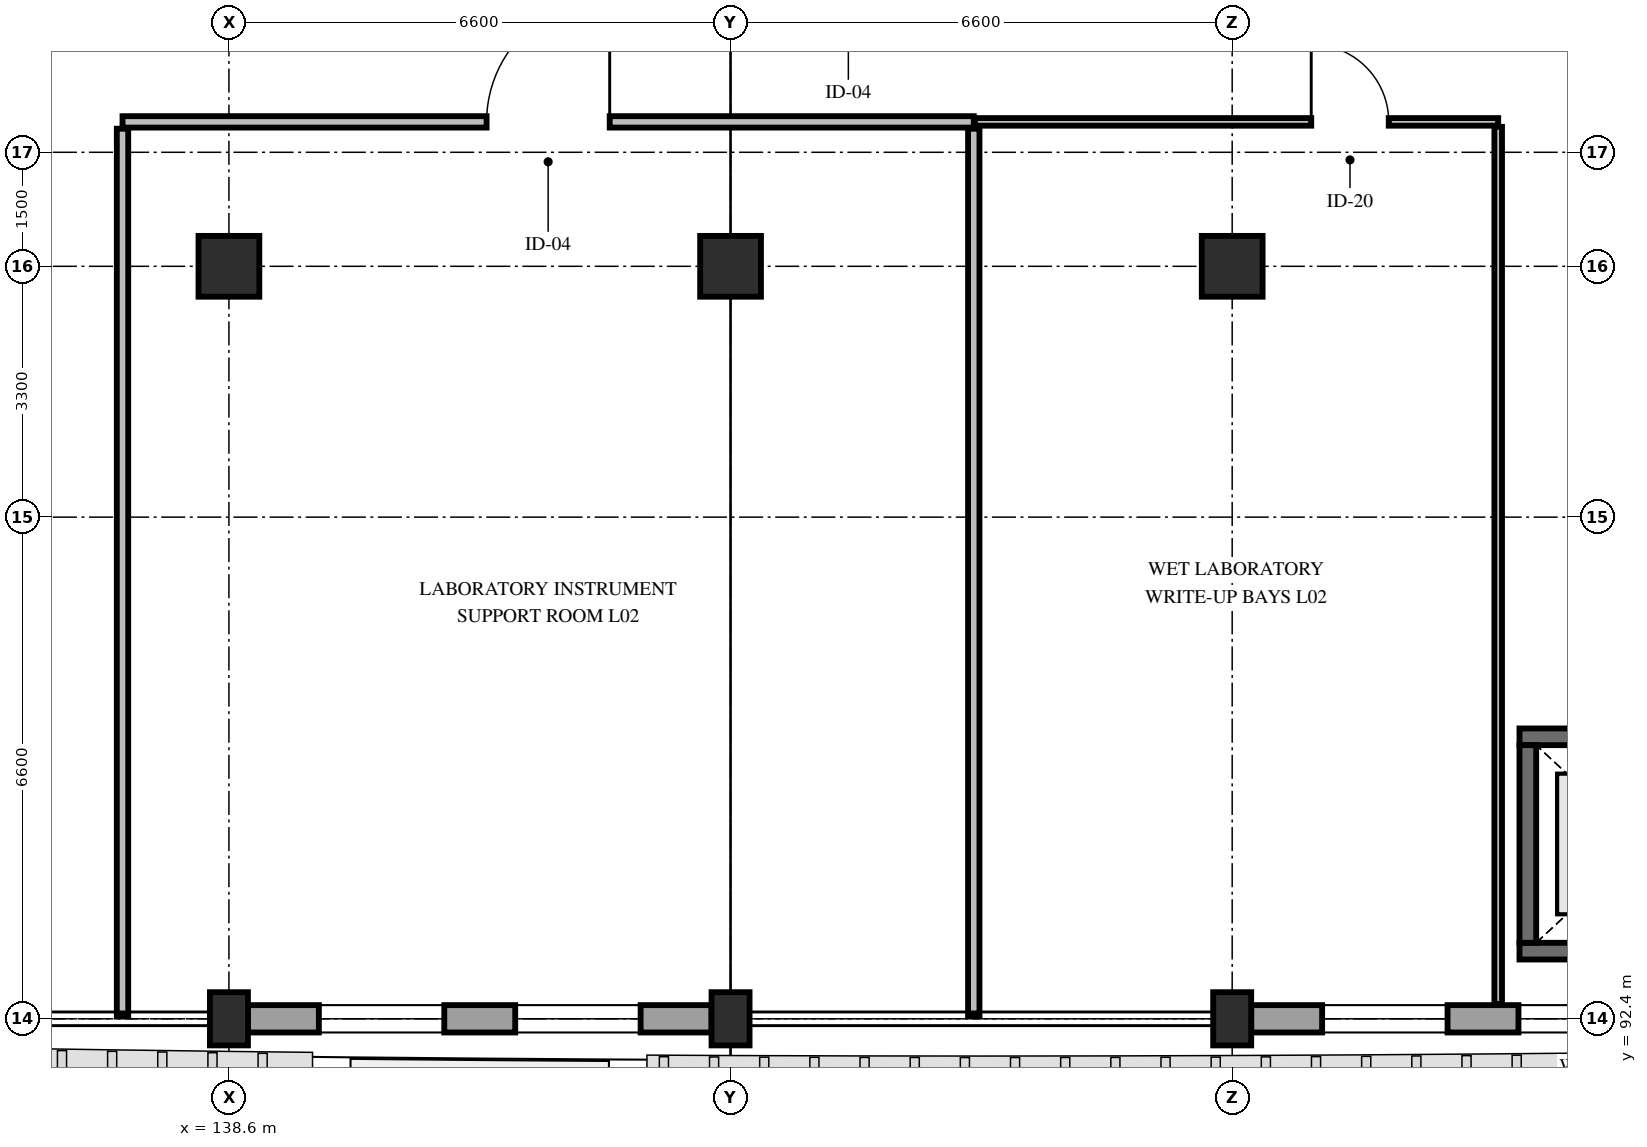
"""IFC4 building model, lengths in metres.
Left out: names, types, materials, properties, quantities, classifications, styles, units other than length and angle.
Written with IfcOpenShell. Run it as: python <this file> out.ifc"""

import sys

from ifc_helpers import new_model, si_unit, direction, frame, frame_2d, origin, origin_2d, place, context, subcontext, project, spatial, rectangle, extrude, element, fill, save


model = new_model("IFC4")
c1 = context("Model", 3, precision=1e-05, world=origin(), true_north=direction((0.0, 1.0)))
c2 = subcontext(c1, "Body", "Model", "MODEL_VIEW")
j1 = project(units=[si_unit("LENGTHUNIT", "METRE"), si_unit("PLANEANGLEUNIT", "RADIAN")], contexts=[c1])
p1 = place(None, origin())
s1 = spatial("IfcSite", under=j1, at=p1, CompositionType="ELEMENT")
p2 = place(p1, origin())
s2 = spatial("IfcBuilding", under=s1, at=p2, CompositionType="ELEMENT")
p3 = place(p2, frame((0.0, 0.0, 10.2)))
s3 = spatial("IfcBuildingStorey", under=s2, at=p3, CompositionType="ELEMENT", Elevation=10.2)
p4 = place(p3, frame((138.6, 92.4, 0.0), z_axis=(0.0, 0.0, 1.0), x_axis=(1.0, 0.0, 0.0)))
e1 = element("IfcColumn", 1, at=p4, inside=s3, PredefinedType="PILASTER", context=c2, shape_type="SweptSolid", body=[
    extrude(rectangle(XDim=0.5, YDim=0.7, at=origin_2d()), origin(), (0.0, 0.0, 1.0), 4.8),
])
p5 = place(p3, frame((138.6, 102.3, 0.0), z_axis=(0.0, 0.0, 1.0), x_axis=(1.0, 0.0, 0.0)))
e2 = element("IfcColumn", 2, at=p5, inside=s3, PredefinedType="COLUMN", context=c2, shape_type="SweptSolid", body=[
    extrude(rectangle(XDim=0.8, YDim=0.8, at=origin_2d()), origin(), (0.0, 0.0, 1.0), 4.8),
])
p6 = place(p3, frame((145.2, 92.4, 0.0), z_axis=(0.0, 0.0, 1.0), x_axis=(1.0, 0.0, 0.0)))
e3 = element("IfcColumn", 3, at=p6, inside=s3, PredefinedType="PILASTER", context=c2, shape_type="SweptSolid", body=[
    extrude(rectangle(XDim=0.5, YDim=0.7, at=origin_2d()), origin(), (0.0, 0.0, 1.0), 4.8),
])
p7 = place(p3, frame((145.2, 102.3, 0.0), z_axis=(0.0, 0.0, 1.0), x_axis=(1.0, 0.0, 0.0)))
e4 = element("IfcColumn", 4, at=p7, inside=s3, PredefinedType="COLUMN", context=c2, shape_type="SweptSolid", body=[
    extrude(rectangle(XDim=0.8, YDim=0.8, at=origin_2d()), origin(), (0.0, 0.0, 1.0), 4.8),
])
p8 = place(p3, frame((151.8, 92.4, 0.0), z_axis=(0.0, 0.0, 1.0), x_axis=(1.0, 0.0, 0.0)))
e5 = element("IfcColumn", 5, at=p8, inside=s3, PredefinedType="PILASTER", context=c2, shape_type="SweptSolid", body=[
    extrude(rectangle(XDim=0.5, YDim=0.7, at=origin_2d()), origin(), (0.0, 0.0, 1.0), 4.8),
])
p9 = place(p3, frame((151.8, 102.3, 0.0), z_axis=(0.0, 0.0, 1.0), x_axis=(1.0, 0.0, 0.0)))
e6 = element("IfcColumn", 6, at=p9, inside=s3, PredefinedType="COLUMN", context=c2, shape_type="SweptSolid", body=[
    extrude(rectangle(XDim=0.8, YDim=0.8, at=origin_2d()), origin(), (0.0, 0.0, 1.0), 4.8),
])
p10 = place(p3, frame((158.15, 92.4, 0.0), z_axis=(0.0, 0.0, 1.0), x_axis=(-1.0, 0.0, 0.0)))
e7 = element("IfcWall", 7, at=p10, inside=s3, PredefinedType="STANDARD", context=c2, shape_type="SweptSolid", body=[
    extrude(rectangle(XDim=6.1, YDim=0.36, at=frame_2d((3.05, 0.0))), origin(), (0.0, 0.0, 1.0), 3.78),
])
p11 = place(p10, frame((0.933, 0.0, 0.85)))
e8 = element("IfcOpeningElement", 8, at=p11, cuts=e7, PredefinedType="OPENING", context=c2, shape_type="SweptSolid", body=[
    extrude(rectangle(XDim=1.65, YDim=2.08, at=frame_2d((0.825, 1.04))), frame((0.0, 0.195, 0.0), z_axis=(0.0, -1.0, 0.0), x_axis=(1.0, 0.0, 0.0)), (0.0, 0.0, 1.0), 0.39),
])
p12 = place(p10, frame((3.517, 0.0, 0.85)))
e9 = element("IfcOpeningElement", 9, at=p12, cuts=e7, PredefinedType="OPENING", context=c2, shape_type="SweptSolid", body=[
    extrude(rectangle(XDim=1.65, YDim=2.08, at=frame_2d((0.825, 1.04))), frame((0.0, 0.195, 0.0), z_axis=(0.0, -1.0, 0.0), x_axis=(1.0, 0.0, 0.0)), (0.0, 0.0, 1.0), 0.39),
])
p13 = place(p3, frame((144.95, 92.4, 0.0), z_axis=(0.0, 0.0, 1.0), x_axis=(-1.0, 0.0, 0.0)))
e10 = element("IfcWall", 10, at=p13, inside=s3, PredefinedType="STANDARD", context=c2, shape_type="SweptSolid", body=[
    extrude(rectangle(XDim=6.1, YDim=0.36, at=frame_2d((3.05, 0.0))), origin(), (0.0, 0.0, 1.0), 3.78),
])
p14 = place(p13, frame((0.933, 0.0, 0.85)))
e11 = element("IfcOpeningElement", 11, at=p14, cuts=e10, PredefinedType="OPENING", context=c2, shape_type="SweptSolid", body=[
    extrude(rectangle(XDim=1.65, YDim=2.08, at=frame_2d((0.825, 1.04))), frame((0.0, 0.195, 0.0), z_axis=(0.0, -1.0, 0.0), x_axis=(1.0, 0.0, 0.0)), (0.0, 0.0, 1.0), 0.39),
])
p15 = place(p13, frame((3.517, 0.0, 0.85)))
e12 = element("IfcOpeningElement", 12, at=p15, cuts=e10, PredefinedType="OPENING", context=c2, shape_type="SweptSolid", body=[
    extrude(rectangle(XDim=1.65, YDim=2.08, at=frame_2d((0.825, 1.04))), frame((0.0, 0.195, 0.0), z_axis=(0.0, -1.0, 0.0), x_axis=(1.0, 0.0, 0.0)), (0.0, 0.0, 1.0), 0.39),
])
p16 = place(p3, frame((155.58, 93.29, 0.0), z_axis=(0.0, 0.0, 1.0), x_axis=(1.0, 0.0, 0.0)))
e13 = element("IfcWall", 13, at=p16, inside=s3, PredefinedType="SHEAR", context=c2, shape_type="SweptSolid", body=[
    extrude(rectangle(XDim=3.24, YDim=0.22, at=frame_2d((1.62, 0.0))), origin(), (0.0, 0.0, 1.0), 4.46),
])
p17 = place(p3, frame((155.58, 96.11, 0.0), z_axis=(0.0, 0.0, 1.0), x_axis=(1.0, 0.0, 0.0)))
e14 = element("IfcWall", 14, at=p17, inside=s3, PredefinedType="SHEAR", context=c2, shape_type="SweptSolid", body=[
    extrude(rectangle(XDim=3.24, YDim=0.22, at=frame_2d((1.62, 0.0))), origin(), (0.0, 0.0, 1.0), 4.46),
])
p18 = place(p17, frame((0.92, 0.0, 0.0)))
e15 = element("IfcOpeningElement", 15, at=p18, cuts=e14, PredefinedType="OPENING", context=c2, shape_type="SweptSolid", body=[
    extrude(rectangle(XDim=1.4, YDim=2.3, at=frame_2d((0.7, 1.15))), frame((0.0, 0.125, 0.0), z_axis=(0.0, -1.0, 0.0), x_axis=(1.0, 0.0, 0.0)), (0.0, 0.0, 1.0), 0.25),
])
p19 = place(p3, frame((155.69, 93.4, 0.0), z_axis=(0.0, 0.0, 1.0), x_axis=(0.0, 1.0, 0.0)))
e16 = element("IfcWall", 16, at=p19, inside=s3, PredefinedType="SHEAR", context=c2, shape_type="SweptSolid", body=[
    extrude(rectangle(XDim=2.6, YDim=0.22, at=frame_2d((1.3, 0.0))), origin(), (0.0, 0.0, 1.0), 4.46),
])
p20 = place(p3, frame((137.2, 104.2, 0.0), z_axis=(0.0, 0.0, 1.0), x_axis=(1.0, 0.0, 0.0)))
e17 = element("IfcWall", 17, at=p20, inside=s3, PredefinedType="PARTITIONING", context=c2, shape_type="SweptSolid", body=[
    extrude(rectangle(XDim=11.2, YDim=0.15, at=frame_2d((5.6, 0.0))), origin(), (0.0, 0.0, 1.0), 3.78),
])
p21 = place(p20, frame((4.79, 0.0, 0.0)))
e18 = element("IfcOpeningElement", 18, at=p21, cuts=e17, PredefinedType="OPENING", context=c2, shape_type="SweptSolid", body=[
    extrude(rectangle(XDim=1.62, YDim=2.3, at=frame_2d((0.81, 1.15))), frame((0.0, 0.09, 0.0), z_axis=(0.0, -1.0, 0.0), x_axis=(1.0, 0.0, 0.0)), (0.0, 0.0, 1.0), 0.18),
])
for number, where, z_axis, x_axis in (
    (19, (137.2, 92.44, 0.0), (0.0, 0.0, 1.0), (0.0, 1.0, 0.0)),
    (20, (148.4, 92.44, 0.0), (0.0, 0.0, 1.0), (0.0, 1.0, 0.0)),
):
    element("IfcWall", number, at=place(p3, frame(where, z_axis=z_axis, x_axis=x_axis)), inside=s3, PredefinedType="PARTITIONING", context=c2, shape_type="SweptSolid", body=[
        extrude(rectangle(XDim=11.67, YDim=0.15, at=frame_2d((5.835, 0.0))), origin(), (0.0, 0.0, 1.0), 3.93),
    ])
p22 = place(p3, frame((148.415, 104.2, 0.0), z_axis=(0.0, 0.0, 1.0), x_axis=(1.0, 0.0, 0.0)))
e21 = element("IfcWall", 21, at=p22, inside=s3, PredefinedType="PARTITIONING", context=c2, shape_type="SweptSolid", body=[
    extrude(rectangle(XDim=6.885, YDim=0.1, at=frame_2d((3.442, 0.0))), origin(), (0.0, 0.0, 1.0), 3.78),
])
p23 = place(p22, frame((4.425, 0.0, 0.0)))
e22 = element("IfcOpeningElement", 22, at=p23, cuts=e21, PredefinedType="OPENING", context=c2, shape_type="SweptSolid", body=[
    extrude(rectangle(XDim=1.02, YDim=2.2, at=frame_2d((0.51, 1.1))), frame((0.0, 0.065, 0.0), z_axis=(0.0, -1.0, 0.0), x_axis=(1.0, 0.0, 0.0)), (0.0, 0.0, 1.0), 0.13),
])
p24 = place(p3, frame((155.3, 92.595, 0.0), z_axis=(0.0, 0.0, 1.0), x_axis=(0.0, 1.0, 0.0)))
e23 = element("IfcWall", 23, at=p24, inside=s3, PredefinedType="PARTITIONING", context=c2, shape_type="SweptSolid", body=[
    extrude(rectangle(XDim=11.54, YDim=0.1, at=frame_2d((5.77, 0.0))), origin(), (0.0, 0.0, 1.0), 3.93),
])
p25 = place(p11, origin())
e24 = element("IfcWindow", 24, at=p25, inside=s3, PartitioningType="SINGLE_PANEL", PredefinedType="WINDOW", context=c2, shape_type="SweptSolid", body=[
    extrude(rectangle(XDim=1.65, YDim=2.08, at=frame_2d((0.825, 1.04))), frame((0.0, 0.03, 0.0), z_axis=(0.0, -1.0, 0.0), x_axis=(1.0, 0.0, 0.0)), (0.0, 0.0, 1.0), 0.06),
])
fill(e8, e24)
p26 = place(p12, origin())
e25 = element("IfcWindow", 25, at=p26, inside=s3, PartitioningType="SINGLE_PANEL", PredefinedType="WINDOW", context=c2, shape_type="SweptSolid", body=[
    extrude(rectangle(XDim=1.65, YDim=2.08, at=frame_2d((0.825, 1.04))), frame((0.0, 0.03, 0.0), z_axis=(0.0, -1.0, 0.0), x_axis=(1.0, 0.0, 0.0)), (0.0, 0.0, 1.0), 0.06),
])
fill(e9, e25)
p27 = place(p14, origin())
e26 = element("IfcWindow", 26, at=p27, inside=s3, PartitioningType="SINGLE_PANEL", PredefinedType="WINDOW", context=c2, shape_type="SweptSolid", body=[
    extrude(rectangle(XDim=1.65, YDim=2.08, at=frame_2d((0.825, 1.04))), frame((0.0, 0.03, 0.0), z_axis=(0.0, -1.0, 0.0), x_axis=(1.0, 0.0, 0.0)), (0.0, 0.0, 1.0), 0.06),
])
fill(e11, e26)
p28 = place(p15, origin())
e27 = element("IfcWindow", 27, at=p28, inside=s3, PartitioningType="SINGLE_PANEL", PredefinedType="WINDOW", context=c2, shape_type="SweptSolid", body=[
    extrude(rectangle(XDim=1.65, YDim=2.08, at=frame_2d((0.825, 1.04))), frame((0.0, 0.03, 0.0), z_axis=(0.0, -1.0, 0.0), x_axis=(1.0, 0.0, 0.0)), (0.0, 0.0, 1.0), 0.06),
])
fill(e12, e27)
p29 = place(p21, origin())
e28 = element("IfcDoor", 28, at=p29, inside=s3, OperationType="SINGLE_SWING_RIGHT", PredefinedType="DOOR", context=c2, shape_type="SweptSolid", body=[
    extrude(rectangle(XDim=1.62, YDim=2.3, at=frame_2d((0.81, 1.15))), frame((0.0, 0.025, 0.0), z_axis=(0.0, -1.0, 0.0), x_axis=(1.0, 0.0, 0.0)), (0.0, 0.0, 1.0), 0.05),
])
fill(e18, e28)
p30 = place(p23, origin())
e29 = element("IfcDoor", 29, at=p30, inside=s3, OperationType="SINGLE_SWING_LEFT", PredefinedType="DOOR", context=c2, shape_type="SweptSolid", body=[
    extrude(rectangle(XDim=1.02, YDim=2.2, at=frame_2d((0.51, 1.1))), frame((0.0, 0.025, 0.0), z_axis=(0.0, -1.0, 0.0), x_axis=(1.0, 0.0, 0.0)), (0.0, 0.0, 1.0), 0.05),
])
fill(e22, e29)
save(model, sys.argv[1])
